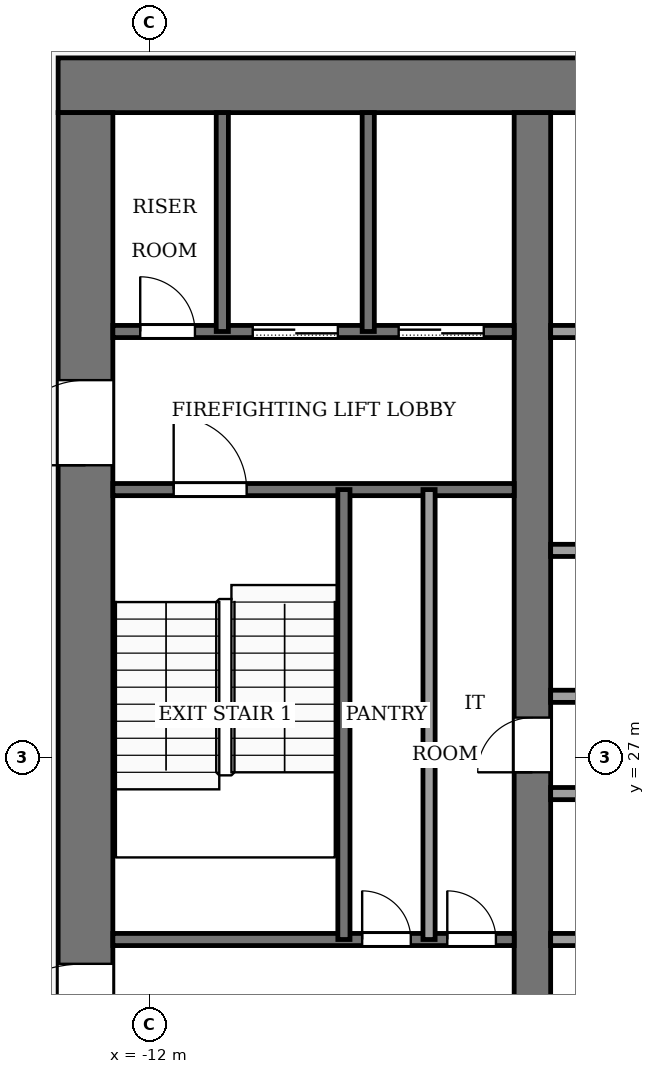
"""IFC4 building model, lengths in metres.
Left out: names, types, materials, properties, quantities, classifications, styles, units other than length and angle.
Written with IfcOpenShell. Run it as: python <this file> out.ifc"""

import sys

from ifc_helpers import new_model, si_unit, direction, frame, frame_2d, origin, place, context, subcontext, project, spatial, rectangle, extrude, element, fill, save


model = new_model("IFC4")
c1 = context("Model", 3, precision=1e-05, world=origin(), true_north=direction((0.0, 1.0)))
c2 = subcontext(c1, "Body", "Model", "MODEL_VIEW")
j1 = project(units=[si_unit("LENGTHUNIT", "METRE"), si_unit("PLANEANGLEUNIT", "RADIAN")], contexts=[c1])
p1 = place(None, origin())
s1 = spatial("IfcSite", under=j1, at=p1, CompositionType="ELEMENT")
p2 = place(p1, origin())
s2 = spatial("IfcBuilding", under=s1, at=p2, CompositionType="ELEMENT")
p3 = place(p2, frame((0.0, 0.0, 182.0)))
s3 = spatial("IfcBuildingStorey", under=s2, at=p3, CompositionType="ELEMENT", Elevation=182.0)
p4 = place(p3, frame((-13.5, 38.05, -0.13), z_axis=(0.0, 0.0, 1.0), x_axis=(1.0, 0.0, 0.0)))
e1 = element("IfcWall", 1, at=p4, inside=s3, PredefinedType="SHEAR", context=c2, shape_type="SweptSolid", body=[
    extrude(rectangle(XDim=27.0, YDim=0.9, at=frame_2d((13.5, 0.0))), origin(), (0.0, 0.0, 1.0), 4.0),
])
p5 = place(p3, frame((-13.05, 18.4, -0.13), z_axis=(0.0, 0.0, 1.0), x_axis=(0.0, 1.0, 0.0)))
e2 = element("IfcWall", 2, at=p5, inside=s3, PredefinedType="SHEAR", context=c2, shape_type="SweptSolid", body=[
    extrude(rectangle(XDim=19.2, YDim=0.9, at=frame_2d((9.6, 0.0))), origin(), (0.0, 0.0, 1.0), 4.0),
])
p6 = place(p5, frame((2.8, 0.0, 0.13)))
e3 = element("IfcOpeningElement", 3, at=p6, cuts=e2, PredefinedType="OPENING", context=c2, shape_type="SweptSolid", body=[
    extrude(rectangle(XDim=2.4, YDim=2.4, at=frame_2d((1.2, 1.2))), frame((0.0, 0.46, 0.0), z_axis=(0.0, -1.0, 0.0), x_axis=(1.0, 0.0, 0.0)), (0.0, 0.0, 1.0), 0.92),
])
p7 = place(p5, frame((13.4, 0.0, 0.13)))
e4 = element("IfcOpeningElement", 4, at=p7, cuts=e2, PredefinedType="OPENING", context=c2, shape_type="SweptSolid", body=[
    extrude(rectangle(XDim=1.4, YDim=2.2, at=frame_2d((0.7, 1.1))), frame((0.0, 0.46, 0.0), z_axis=(0.0, -1.0, 0.0), x_axis=(1.0, 0.0, 0.0)), (0.0, 0.0, 1.0), 0.92),
])
p8 = place(p3, frame((-5.7, 18.4, -0.13), z_axis=(0.0, 0.0, 1.0), x_axis=(0.0, 1.0, 0.0)))
e5 = element("IfcWall", 5, at=p8, inside=s3, PredefinedType="SHEAR", context=c2, shape_type="SweptSolid", body=[
    extrude(rectangle(XDim=19.2, YDim=0.6, at=frame_2d((9.6, 0.0))), origin(), (0.0, 0.0, 1.0), 4.0),
])
p9 = place(p8, frame((8.35, 0.0, 0.13)))
e6 = element("IfcOpeningElement", 6, at=p9, cuts=e5, PredefinedType="OPENING", context=c2, shape_type="SweptSolid", body=[
    extrude(rectangle(XDim=0.9, YDim=2.1, at=frame_2d((0.45, 1.05))), frame((0.0, 0.31, 0.0), z_axis=(0.0, -1.0, 0.0), x_axis=(1.0, 0.0, 0.0)), (0.0, 0.0, 1.0), 0.62),
])
p10 = place(p3, frame((-12.6, 24.0, 0.0), z_axis=(0.0, 0.0, 1.0), x_axis=(1.0, 0.0, 0.0)))
e7 = element("IfcWall", 7, at=p10, inside=s3, PredefinedType="PARTITIONING", context=c2, shape_type="SweptSolid", body=[
    extrude(rectangle(XDim=6.6, YDim=0.2, at=frame_2d((3.3, 0.0))), origin(), (0.0, 0.0, 1.0), 3.87),
])
p11 = place(p10, frame((4.1, 0.0, 0.0)))
e8 = element("IfcOpeningElement", 8, at=p11, cuts=e7, PredefinedType="OPENING", context=c2, shape_type="SweptSolid", body=[
    extrude(rectangle(XDim=0.8, YDim=2.1, at=frame_2d((0.4, 1.05))), frame((0.0, 0.11, 0.0), z_axis=(0.0, -1.0, 0.0), x_axis=(1.0, 0.0, 0.0)), (0.0, 0.0, 1.0), 0.22),
])
p12 = place(p10, frame((5.5, 0.0, 0.0)))
e9 = element("IfcOpeningElement", 9, at=p12, cuts=e7, PredefinedType="OPENING", context=c2, shape_type="SweptSolid", body=[
    extrude(rectangle(XDim=0.8, YDim=2.1, at=frame_2d((0.4, 1.05))), frame((0.0, 0.11, 0.0), z_axis=(0.0, -1.0, 0.0), x_axis=(1.0, 0.0, 0.0)), (0.0, 0.0, 1.0), 0.22),
])
p13 = place(p3, frame((-5.4, 24.0, 0.0), z_axis=(0.0, 0.0, 1.0), x_axis=(1.0, 0.0, 0.0)))
e10 = element("IfcWall", 10, at=p13, inside=s3, PredefinedType="PARTITIONING", context=c2, shape_type="SweptSolid", body=[
    extrude(rectangle(XDim=10.8, YDim=0.2, at=frame_2d((5.4, 0.0))), origin(), (0.0, 0.0, 1.0), 3.87),
])
p14 = place(p13, frame((0.75, 0.0, 0.0)))
e11 = element("IfcOpeningElement", 11, at=p14, cuts=e10, PredefinedType="OPENING", context=c2, shape_type="SweptSolid", body=[
    extrude(rectangle(XDim=1.2, YDim=2.2, at=frame_2d((0.6, 1.1))), frame((0.0, 0.11, 0.0), z_axis=(0.0, -1.0, 0.0), x_axis=(1.0, 0.0, 0.0)), (0.0, 0.0, 1.0), 0.22),
])
p15 = place(p13, frame((3.45, 0.0, 0.0)))
e12 = element("IfcOpeningElement", 12, at=p15, cuts=e10, PredefinedType="OPENING", context=c2, shape_type="SweptSolid", body=[
    extrude(rectangle(XDim=1.2, YDim=2.2, at=frame_2d((0.6, 1.1))), frame((0.0, 0.11, 0.0), z_axis=(0.0, -1.0, 0.0), x_axis=(1.0, 0.0, 0.0)), (0.0, 0.0, 1.0), 0.22),
])
p16 = place(p13, frame((6.15, 0.0, 0.0)))
e13 = element("IfcOpeningElement", 13, at=p16, cuts=e10, PredefinedType="OPENING", context=c2, shape_type="SweptSolid", body=[
    extrude(rectangle(XDim=1.2, YDim=2.2, at=frame_2d((0.6, 1.1))), frame((0.0, 0.11, 0.0), z_axis=(0.0, -1.0, 0.0), x_axis=(1.0, 0.0, 0.0)), (0.0, 0.0, 1.0), 0.22),
])
p17 = place(p13, frame((8.85, 0.0, 0.0)))
e14 = element("IfcOpeningElement", 14, at=p17, cuts=e10, PredefinedType="OPENING", context=c2, shape_type="SweptSolid", body=[
    extrude(rectangle(XDim=1.2, YDim=2.2, at=frame_2d((0.6, 1.1))), frame((0.0, 0.11, 0.0), z_axis=(0.0, -1.0, 0.0), x_axis=(1.0, 0.0, 0.0)), (0.0, 0.0, 1.0), 0.22),
])
for number, where, z_axis, x_axis in (
    (15, (-5.4, 26.4, 0.0), (0.0, 0.0, 1.0), (1.0, 0.0, 0.0)),
    (16, (-5.4, 28.0, 0.0), (0.0, 0.0, 1.0), (1.0, 0.0, 0.0)),
    (17, (-5.4, 30.4, 0.0), (0.0, 0.0, 1.0), (1.0, 0.0, 0.0)),
):
    element("IfcWall", number, at=place(p3, frame(where, z_axis=z_axis, x_axis=x_axis)), inside=s3, PredefinedType="PARTITIONING", context=c2, shape_type="SweptSolid", body=[
        extrude(rectangle(XDim=10.8, YDim=0.2, at=frame_2d((5.4, 0.0))), origin(), (0.0, 0.0, 1.0), 3.87),
    ])
p18 = place(p3, frame((-12.6, 31.4, 0.0), z_axis=(0.0, 0.0, 1.0), x_axis=(1.0, 0.0, 0.0)))
e18 = element("IfcWall", 18, at=p18, inside=s3, PredefinedType="PARTITIONING", context=c2, shape_type="SweptSolid", body=[
    extrude(rectangle(XDim=6.6, YDim=0.2, at=frame_2d((3.3, 0.0))), origin(), (0.0, 0.0, 1.0), 3.87),
])
p19 = place(p18, frame((1.0, 0.0, 0.0)))
e19 = element("IfcOpeningElement", 19, at=p19, cuts=e18, PredefinedType="OPENING", context=c2, shape_type="SweptSolid", body=[
    extrude(rectangle(XDim=1.2, YDim=2.2, at=frame_2d((0.6, 1.1))), frame((0.0, 0.11, 0.0), z_axis=(0.0, -1.0, 0.0), x_axis=(1.0, 0.0, 0.0)), (0.0, 0.0, 1.0), 0.22),
])
p20 = place(p3, frame((-12.6, 34.0, 0.0), z_axis=(0.0, 0.0, 1.0), x_axis=(1.0, 0.0, 0.0)))
e20 = element("IfcWall", 20, at=p20, inside=s3, PredefinedType="PARTITIONING", context=c2, shape_type="SweptSolid", body=[
    extrude(rectangle(XDim=6.6, YDim=0.2, at=frame_2d((3.3, 0.0))), origin(), (0.0, 0.0, 1.0), 3.87),
])
p21 = place(p20, frame((4.7, 0.0, 0.0)))
e21 = element("IfcOpeningElement", 21, at=p21, cuts=e20, PredefinedType="OPENING", context=c2, shape_type="SweptSolid", body=[
    extrude(rectangle(XDim=1.4, YDim=2.2, at=frame_2d((0.7, 1.1))), frame((0.0, 0.11, 0.0), z_axis=(0.0, -1.0, 0.0), x_axis=(1.0, 0.0, 0.0)), (0.0, 0.0, 1.0), 0.22),
])
p22 = place(p20, frame((2.3, 0.0, 0.0)))
e22 = element("IfcOpeningElement", 22, at=p22, cuts=e20, PredefinedType="OPENING", context=c2, shape_type="SweptSolid", body=[
    extrude(rectangle(XDim=1.4, YDim=2.2, at=frame_2d((0.7, 1.1))), frame((0.0, 0.11, 0.0), z_axis=(0.0, -1.0, 0.0), x_axis=(1.0, 0.0, 0.0)), (0.0, 0.0, 1.0), 0.22),
])
p23 = place(p20, frame((0.45, 0.0, 0.0)))
e23 = element("IfcOpeningElement", 23, at=p23, cuts=e20, PredefinedType="OPENING", context=c2, shape_type="SweptSolid", body=[
    extrude(rectangle(XDim=0.9, YDim=2.1, at=frame_2d((0.45, 1.05))), frame((0.0, 0.11, 0.0), z_axis=(0.0, -1.0, 0.0), x_axis=(1.0, 0.0, 0.0)), (0.0, 0.0, 1.0), 0.22),
])
p24 = place(p3, frame((-5.4, 34.0, 0.0), z_axis=(0.0, 0.0, 1.0), x_axis=(1.0, 0.0, 0.0)))
e24 = element("IfcWall", 24, at=p24, inside=s3, PredefinedType="PARTITIONING", context=c2, shape_type="SweptSolid", body=[
    extrude(rectangle(XDim=10.8, YDim=0.2, at=frame_2d((5.4, 0.0))), origin(), (0.0, 0.0, 1.0), 3.87),
])
p25 = place(p24, frame((6.15, 0.0, 0.0)))
e25 = element("IfcOpeningElement", 25, at=p25, cuts=e24, PredefinedType="OPENING", context=c2, shape_type="SweptSolid", body=[
    extrude(rectangle(XDim=1.2, YDim=2.2, at=frame_2d((0.6, 1.1))), frame((0.0, 0.11, 0.0), z_axis=(0.0, -1.0, 0.0), x_axis=(1.0, 0.0, 0.0)), (0.0, 0.0, 1.0), 0.22),
])
p26 = place(p24, frame((8.95, 0.0, 0.0)))
e26 = element("IfcOpeningElement", 26, at=p26, cuts=e24, PredefinedType="OPENING", context=c2, shape_type="SweptSolid", body=[
    extrude(rectangle(XDim=1.0, YDim=2.1, at=frame_2d((0.5, 1.05))), frame((0.0, 0.11, 0.0), z_axis=(0.0, -1.0, 0.0), x_axis=(1.0, 0.0, 0.0)), (0.0, 0.0, 1.0), 0.22),
])
p27 = place(p3, frame((-10.8, 34.0, 0.0), z_axis=(0.0, 0.0, 1.0), x_axis=(0.0, 1.0, 0.0)))
e27 = element("IfcWall", 27, at=p27, inside=s3, PredefinedType="PARTITIONING", context=c2, shape_type="SweptSolid", body=[
    extrude(rectangle(XDim=3.6, YDim=0.2, at=frame_2d((1.8, 0.0))), origin(), (0.0, 0.0, 1.0), 3.87),
])
p28 = place(p3, frame((-8.8, 24.0, 0.0), z_axis=(0.0, 0.0, 1.0), x_axis=(0.0, 1.0, 0.0)))
e28 = element("IfcWall", 28, at=p28, inside=s3, PredefinedType="PARTITIONING", context=c2, shape_type="SweptSolid", body=[
    extrude(rectangle(XDim=7.4, YDim=0.2, at=frame_2d((3.7, 0.0))), origin(), (0.0, 0.0, 1.0), 3.87),
])
p29 = place(p3, frame((-8.4, 34.0, 0.0), z_axis=(0.0, 0.0, 1.0), x_axis=(0.0, 1.0, 0.0)))
e29 = element("IfcWall", 29, at=p29, inside=s3, PredefinedType="PARTITIONING", context=c2, shape_type="SweptSolid", body=[
    extrude(rectangle(XDim=3.6, YDim=0.2, at=frame_2d((1.8, 0.0))), origin(), (0.0, 0.0, 1.0), 3.87),
])
p30 = place(p3, frame((-7.4, 24.0, 0.0), z_axis=(0.0, 0.0, 1.0), x_axis=(0.0, 1.0, 0.0)))
e30 = element("IfcWall", 30, at=p30, inside=s3, PredefinedType="PARTITIONING", context=c2, shape_type="SweptSolid", body=[
    extrude(rectangle(XDim=7.4, YDim=0.2, at=frame_2d((3.7, 0.0))), origin(), (0.0, 0.0, 1.0), 3.87),
])
p31 = place(p21, origin())
e31 = element("IfcDoor", 31, at=p31, inside=s3, OperationType="SLIDING_TO_LEFT", PredefinedType="DOOR", context=c2, shape_type="SweptSolid", body=[
    extrude(rectangle(XDim=1.4, YDim=2.2, at=frame_2d((0.7, 1.1))), frame((0.0, 0.025, 0.0), z_axis=(0.0, -1.0, 0.0), x_axis=(1.0, 0.0, 0.0)), (0.0, 0.0, 1.0), 0.05),
])
fill(e21, e31)
p32 = place(p22, origin())
e32 = element("IfcDoor", 32, at=p32, inside=s3, OperationType="SLIDING_TO_LEFT", PredefinedType="DOOR", context=c2, shape_type="SweptSolid", body=[
    extrude(rectangle(XDim=1.4, YDim=2.2, at=frame_2d((0.7, 1.1))), frame((0.0, 0.025, 0.0), z_axis=(0.0, -1.0, 0.0), x_axis=(1.0, 0.0, 0.0)), (0.0, 0.0, 1.0), 0.05),
])
fill(e22, e32)
p33 = place(p23, origin())
e33 = element("IfcDoor", 33, at=p33, inside=s3, OperationType="SINGLE_SWING_RIGHT", PredefinedType="DOOR", context=c2, shape_type="SweptSolid", body=[
    extrude(rectangle(XDim=0.9, YDim=2.1, at=frame_2d((0.45, 1.05))), frame((0.0, 0.025, 0.0), z_axis=(0.0, -1.0, 0.0), x_axis=(1.0, 0.0, 0.0)), (0.0, 0.0, 1.0), 0.05),
])
fill(e23, e33)
p34 = place(p11, origin())
e34 = element("IfcDoor", 34, at=p34, inside=s3, OperationType="SINGLE_SWING_LEFT", PredefinedType="DOOR", context=c2, shape_type="SweptSolid", body=[
    extrude(rectangle(XDim=0.8, YDim=2.1, at=frame_2d((0.4, 1.05))), frame((0.0, 0.025, 0.0), z_axis=(0.0, -1.0, 0.0), x_axis=(1.0, 0.0, 0.0)), (0.0, 0.0, 1.0), 0.05),
])
fill(e8, e34)
p35 = place(p12, origin())
e35 = element("IfcDoor", 35, at=p35, inside=s3, OperationType="SINGLE_SWING_RIGHT", PredefinedType="DOOR", context=c2, shape_type="SweptSolid", body=[
    extrude(rectangle(XDim=0.8, YDim=2.1, at=frame_2d((0.4, 1.05))), frame((0.0, 0.025, 0.0), z_axis=(0.0, -1.0, 0.0), x_axis=(1.0, 0.0, 0.0)), (0.0, 0.0, 1.0), 0.05),
])
fill(e9, e35)
p36 = place(p9, origin())
e36 = element("IfcDoor", 36, at=p36, inside=s3, OperationType="SINGLE_SWING_RIGHT", PredefinedType="DOOR", context=c2, shape_type="SweptSolid", body=[
    extrude(rectangle(XDim=0.9, YDim=2.1, at=frame_2d((0.45, 1.05))), frame((0.0, 0.025, 0.0), z_axis=(0.0, -1.0, 0.0), x_axis=(1.0, 0.0, 0.0)), (0.0, 0.0, 1.0), 0.05),
])
fill(e6, e36)
p37 = place(p19, origin())
e37 = element("IfcDoor", 37, at=p37, inside=s3, OperationType="SINGLE_SWING_RIGHT", PredefinedType="DOOR", context=c2, shape_type="SweptSolid", body=[
    extrude(rectangle(XDim=1.2, YDim=2.2, at=frame_2d((0.6, 1.1))), frame((0.0, 0.025, 0.0), z_axis=(0.0, -1.0, 0.0), x_axis=(1.0, 0.0, 0.0)), (0.0, 0.0, 1.0), 0.05),
])
fill(e19, e37)
p38 = place(p6, origin())
e38 = element("IfcDoor", 38, at=p38, inside=s3, OperationType="DOUBLE_DOOR_SINGLE_SWING", PredefinedType="DOOR", context=c2, shape_type="SweptSolid", body=[
    extrude(rectangle(XDim=2.4, YDim=2.4, at=frame_2d((1.2, 1.2))), frame((0.0, 0.025, 0.0), z_axis=(0.0, -1.0, 0.0), x_axis=(1.0, 0.0, 0.0)), (0.0, 0.0, 1.0), 0.05),
])
fill(e3, e38)
p39 = place(p7, origin())
e39 = element("IfcDoor", 39, at=p39, inside=s3, OperationType="SINGLE_SWING_RIGHT", PredefinedType="DOOR", context=c2, shape_type="SweptSolid", body=[
    extrude(rectangle(XDim=1.4, YDim=2.2, at=frame_2d((0.7, 1.1))), frame((0.0, 0.025, 0.0), z_axis=(0.0, -1.0, 0.0), x_axis=(1.0, 0.0, 0.0)), (0.0, 0.0, 1.0), 0.05),
])
fill(e4, e39)
save(model, sys.argv[1])
